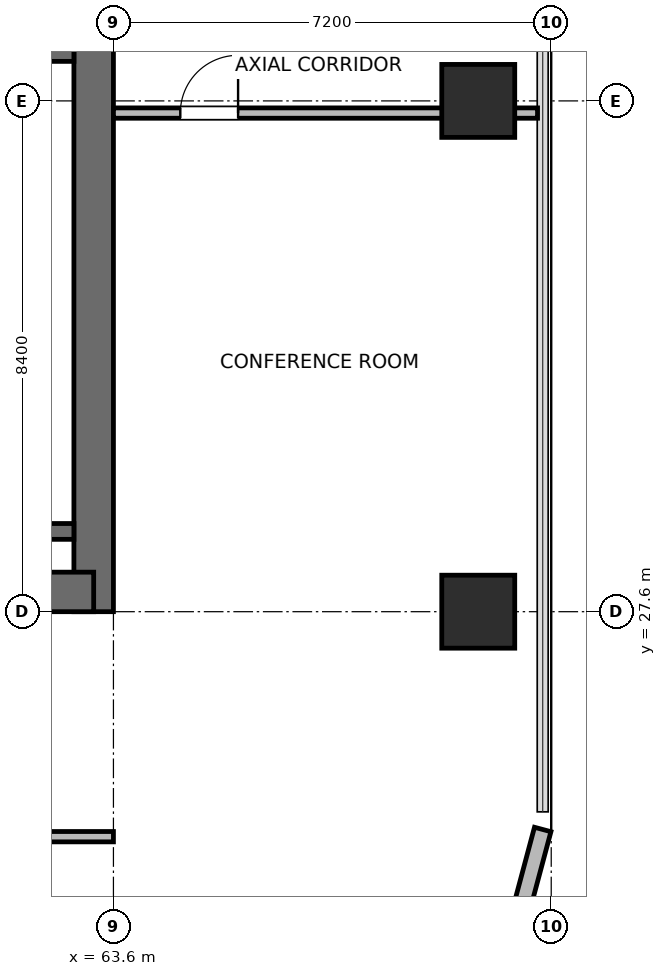
"""IFC4 building model, lengths in metres.
Left out: names, types, materials, properties, quantities, classifications, styles, units other than length and angle.
Written with IfcOpenShell. Run it as: python <this file> out.ifc"""

import sys

from ifc_helpers import new_model, si_unit, direction, frame, frame_2d, origin, origin_2d, place, context, subcontext, project, spatial, rectangle, extrude, element, fill, save


model = new_model("IFC4")
c1 = context("Model", 3, precision=1e-05, world=origin(), true_north=direction((0.0, 1.0)))
c2 = subcontext(c1, "Body", "Model", "MODEL_VIEW")
j1 = project(units=[si_unit("LENGTHUNIT", "METRE"), si_unit("PLANEANGLEUNIT", "RADIAN")], contexts=[c1])
p1 = place(None, origin())
s1 = spatial("IfcSite", under=j1, at=p1, CompositionType="ELEMENT")
p2 = place(p1, origin())
s2 = spatial("IfcBuilding", under=s1, at=p2, CompositionType="ELEMENT")
p3 = place(p2, frame((0.0, 0.0, 205.8)))
s3 = spatial("IfcBuildingStorey", under=s2, at=p3, CompositionType="ELEMENT", Elevation=205.8)
p4 = place(p3, frame((63.275, 27.6, 0.0), z_axis=(0.0, 0.0, 1.0), x_axis=(0.0, 1.0, 0.0)))
e1 = element("IfcWall", 1, at=p4, inside=s3, PredefinedType="SHEAR", context=c2, shape_type="SweptSolid", body=[
    extrude(rectangle(XDim=16.8, YDim=0.65, at=frame_2d((8.4, 0.0))), origin(), (0.0, 0.0, 1.0), 3.9),
])
p5 = place(p3, frame((53.925, 27.925, 0.0), z_axis=(0.0, 0.0, 1.0), x_axis=(1.0, 0.0, 0.0)))
e2 = element("IfcWall", 2, at=p5, inside=s3, PredefinedType="SHEAR", context=c2, shape_type="SweptSolid", body=[
    extrude(rectangle(XDim=9.35, YDim=0.65, at=frame_2d((4.675, 0.0))), origin(), (0.0, 0.0, 1.0), 3.9),
])
p6 = place(p5, frame((3.975, 0.0, 0.0)))
e3 = element("IfcOpeningElement", 3, at=p6, cuts=e2, PredefinedType="OPENING", context=c2, shape_type="SweptSolid", body=[
    extrude(rectangle(XDim=1.05, YDim=2.04, at=frame_2d((0.525, 1.02))), frame((0.0, 0.335, 0.0), z_axis=(0.0, -1.0, 0.0), x_axis=(1.0, 0.0, 0.0)), (0.0, 0.0, 1.0), 0.67),
])
for number, where, z_axis, x_axis in (
    (4, (58.89, 28.92, 0.0), (0.0, 0.0, 1.0), (1.0, 0.0, 0.0)),
    (5, (58.89, 36.78, 0.0), (0.0, 0.0, 1.0), (1.0, 0.0, 0.0)),
):
    element("IfcWall", number, at=place(p3, frame(where, z_axis=z_axis, x_axis=x_axis)), inside=s3, PredefinedType="SHEAR", context=c2, shape_type="SweptSolid", body=[
        extrude(rectangle(XDim=4.06, YDim=0.26, at=frame_2d((2.03, 0.0))), origin(), (0.0, 0.0, 1.0), 3.9),
    ])
for number, where, z_axis, x_axis in (
    (6, (69.6, 27.6, 0.0), (0.0, 0.0, 1.0), (1.0, 0.0, 0.0)),
    (7, (69.6, 36.0, 0.0), (0.0, 0.0, 1.0), (1.0, 0.0, 0.0)),
):
    element("IfcColumn", number, at=place(p3, frame(where, z_axis=z_axis, x_axis=x_axis)), inside=s3, PredefinedType="COLUMN", context=c2, shape_type="SweptSolid", body=[
        extrude(rectangle(XDim=1.2, YDim=1.2, at=origin_2d()), origin(), (0.0, 0.0, 1.0), 3.9),
    ])
p7 = place(p3, frame((70.66, 24.018, 0.0), z_axis=(0.0, 0.0, 1.0), x_axis=(-0.258672222976, -0.9659651552, 0.0)))
e8 = element("IfcWall", 8, at=p7, inside=s3, PredefinedType="SOLIDWALL", context=c2, shape_type="SweptSolid", body=[
    extrude(rectangle(XDim=2.739, YDim=0.28, at=frame_2d((1.37, 0.0))), origin(), (0.0, 0.0, 1.0), 3.6),
])
p8 = place(p3, frame((28.975, 23.9, 0.0), z_axis=(0.0, 0.0, 1.0), x_axis=(1.0, 0.0, 0.0)))
e9 = element("IfcWall", 9, at=p8, inside=s3, PredefinedType="PARTITIONING", context=c2, shape_type="SweptSolid", body=[
    extrude(rectangle(XDim=34.625, YDim=0.17, at=frame_2d((17.312, 0.0))), origin(), (0.0, 0.0, 1.0), 3.6),
])
p9 = place(p8, frame((2.427, 0.0, 0.0)))
e10 = element("IfcOpeningElement", 10, at=p9, cuts=e9, PredefinedType="OPENING", context=c2, shape_type="SweptSolid", body=[
    extrude(rectangle(XDim=0.95, YDim=2.04, at=frame_2d((0.475, 1.02))), frame((0.0, 0.095, 0.0), z_axis=(0.0, -1.0, 0.0), x_axis=(1.0, 0.0, 0.0)), (0.0, 0.0, 1.0), 0.19),
])
p10 = place(p8, frame((7.63, 0.0, 0.0)))
e11 = element("IfcOpeningElement", 11, at=p10, cuts=e9, PredefinedType="OPENING", context=c2, shape_type="SweptSolid", body=[
    extrude(rectangle(XDim=0.95, YDim=2.04, at=frame_2d((0.475, 1.02))), frame((0.0, 0.095, 0.0), z_axis=(0.0, -1.0, 0.0), x_axis=(1.0, 0.0, 0.0)), (0.0, 0.0, 1.0), 0.19),
])
p11 = place(p8, frame((14.535, 0.0, 0.0)))
e12 = element("IfcOpeningElement", 12, at=p11, cuts=e9, PredefinedType="OPENING", context=c2, shape_type="SweptSolid", body=[
    extrude(rectangle(XDim=0.95, YDim=2.04, at=frame_2d((0.475, 1.02))), frame((0.0, 0.095, 0.0), z_axis=(0.0, -1.0, 0.0), x_axis=(1.0, 0.0, 0.0)), (0.0, 0.0, 1.0), 0.19),
])
p12 = place(p8, frame((21.44, 0.0, 0.0)))
e13 = element("IfcOpeningElement", 13, at=p12, cuts=e9, PredefinedType="OPENING", context=c2, shape_type="SweptSolid", body=[
    extrude(rectangle(XDim=0.95, YDim=2.04, at=frame_2d((0.475, 1.02))), frame((0.0, 0.095, 0.0), z_axis=(0.0, -1.0, 0.0), x_axis=(1.0, 0.0, 0.0)), (0.0, 0.0, 1.0), 0.19),
])
p13 = place(p8, frame((26.045, 0.0, 0.0)))
e14 = element("IfcOpeningElement", 14, at=p13, cuts=e9, PredefinedType="OPENING", context=c2, shape_type="SweptSolid", body=[
    extrude(rectangle(XDim=0.95, YDim=2.04, at=frame_2d((0.475, 1.02))), frame((0.0, 0.095, 0.0), z_axis=(0.0, -1.0, 0.0), x_axis=(1.0, 0.0, 0.0)), (0.0, 0.0, 1.0), 0.19),
])
p14 = place(p8, frame((31.25, 0.0, 0.0)))
e15 = element("IfcOpeningElement", 15, at=p14, cuts=e9, PredefinedType="OPENING", context=c2, shape_type="SweptSolid", body=[
    extrude(rectangle(XDim=0.95, YDim=2.04, at=frame_2d((0.475, 1.02))), frame((0.0, 0.095, 0.0), z_axis=(0.0, -1.0, 0.0), x_axis=(1.0, 0.0, 0.0)), (0.0, 0.0, 1.0), 0.19),
])
p15 = place(p3, frame((63.6, 35.8, 0.0), z_axis=(0.0, 0.0, 1.0), x_axis=(1.0, 0.0, 0.0)))
e16 = element("IfcWall", 16, at=p15, inside=s3, PredefinedType="PARTITIONING", context=c2, shape_type="SweptSolid", body=[
    extrude(rectangle(XDim=6.975, YDim=0.17, at=frame_2d((3.487, 0.0))), origin(), (0.0, 0.0, 1.0), 2.135),
])
p16 = place(p15, frame((1.1, 0.0, 0.0)))
e17 = element("IfcOpeningElement", 17, at=p16, cuts=e16, PredefinedType="OPENING", context=c2, shape_type="SweptSolid", body=[
    extrude(rectangle(XDim=0.95, YDim=2.04, at=frame_2d((0.475, 1.02))), frame((0.0, 0.095, 0.0), z_axis=(0.0, -1.0, 0.0), x_axis=(1.0, 0.0, 0.0)), (0.0, 0.0, 1.0), 0.19),
])
p17 = place(p16, origin())
e18 = element("IfcDoor", 18, at=p17, inside=s3, OperationType="SINGLE_SWING_RIGHT", PredefinedType="DOOR", context=c2, shape_type="SweptSolid", body=[
    extrude(rectangle(XDim=0.95, YDim=2.04, at=frame_2d((0.475, 1.02))), frame((0.0, 0.025, 0.0), z_axis=(0.0, -1.0, 0.0), x_axis=(1.0, 0.0, 0.0)), (0.0, 0.0, 1.0), 0.05),
])
fill(e17, e18)
save(model, sys.argv[1])
